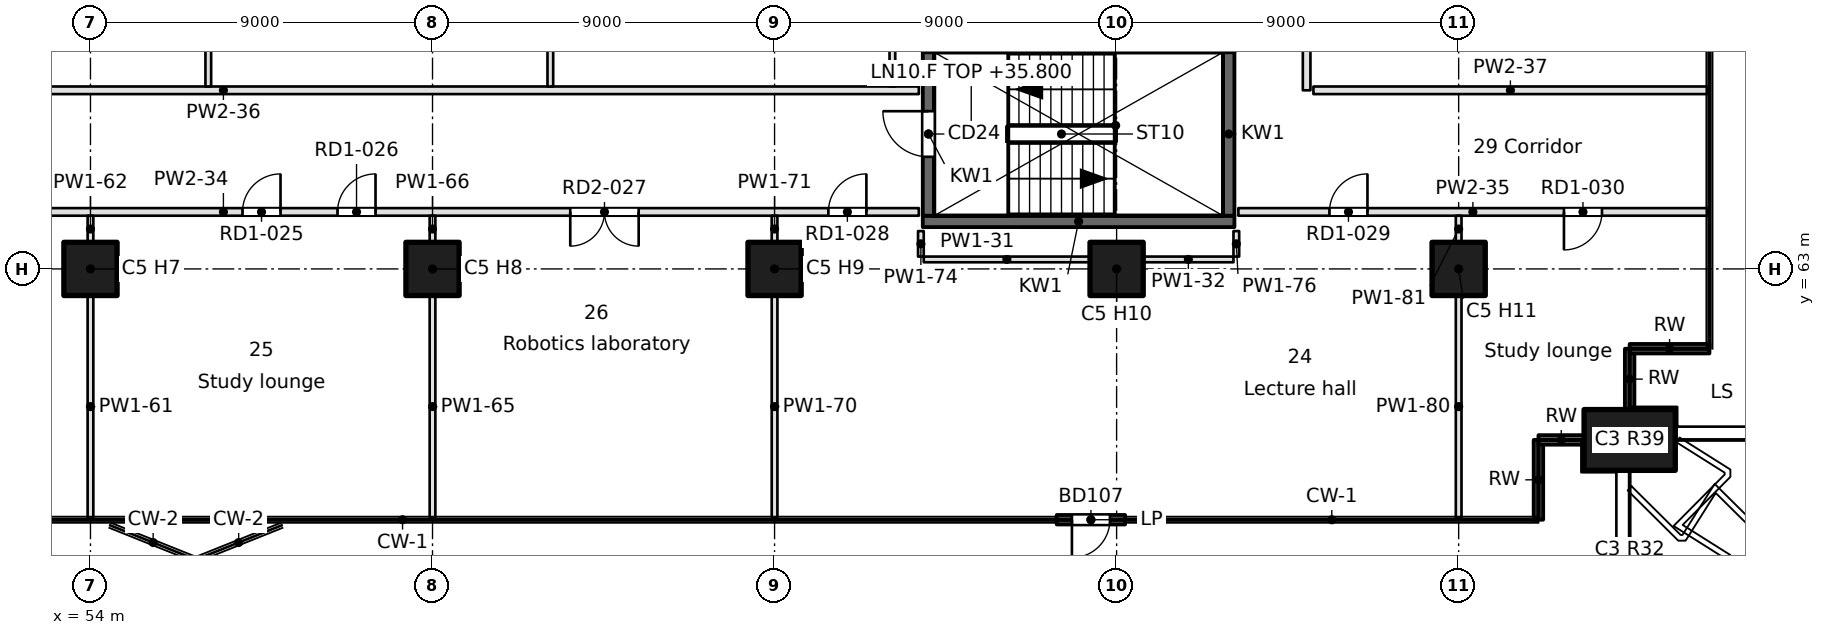
"""IFC4 building model, lengths in metres.
Left out: names, types, materials, properties, quantities, classifications, styles, units other than length and angle.
Written with IfcOpenShell. Run it as: python <this file> out.ifc"""

import sys

from ifc_helpers import new_model, si_unit, direction, frame, frame_2d, origin, origin_2d, place, context, subcontext, project, spatial, rectangle, extrude, element, fill, save


model = new_model("IFC4")
c1 = context("Model", 3, precision=1e-05, world=origin(), true_north=direction((0.0, 1.0)))
c2 = subcontext(c1, "Body", "Model", "MODEL_VIEW")
j1 = project(units=[si_unit("LENGTHUNIT", "METRE"), si_unit("PLANEANGLEUNIT", "RADIAN")], contexts=[c1])
p1 = place(None, origin())
s1 = spatial("IfcSite", under=j1, at=p1, CompositionType="ELEMENT")
p2 = place(p1, origin())
s2 = spatial("IfcBuilding", under=s1, at=p2, CompositionType="ELEMENT")
p3 = place(p2, frame((0.0, 0.0, 35.8)))
s3 = spatial("IfcBuildingStorey", under=s2, at=p3, CompositionType="ELEMENT", Elevation=35.8)
p4 = place(p3, frame((94.5, 58.5, 0.0), z_axis=(0.0, 0.0, 1.0), x_axis=(1.0, 0.0, 0.0)))
e1 = element("IfcColumn", 1, at=p4, inside=s3, PredefinedType="COLUMN", context=c2, shape_type="SweptSolid", body=[
    extrude(rectangle(XDim=2.4, YDim=1.6, at=origin_2d()), origin(), (0.0, 0.0, 1.0), 3.7),
])
for number, where, z_axis, x_axis in (
    (2, (54.0, 63.0, 0.0), (0.0, 0.0, 1.0), (1.0, 0.0, 0.0)),
    (3, (63.0, 63.0, 0.0), (0.0, 0.0, 1.0), (1.0, 0.0, 0.0)),
    (4, (72.0, 63.0, 0.0), (0.0, 0.0, 1.0), (1.0, 0.0, 0.0)),
    (5, (81.0, 63.0, 0.0), (0.0, 0.0, 1.0), (1.0, 0.0, 0.0)),
    (6, (90.0, 63.0, 0.0), (0.0, 0.0, 1.0), (1.0, 0.0, 0.0)),
):
    element("IfcColumn", number, at=place(p3, frame(where, z_axis=z_axis, x_axis=x_axis)), inside=s3, PredefinedType="COLUMN", context=c2, shape_type="SweptSolid", body=[
        extrude(rectangle(XDim=1.4, YDim=1.4, at=origin_2d()), origin(), (0.0, 0.0, 1.0), 3.7),
    ])
p5 = place(p3, frame((79.424, 56.401, 0.0), z_axis=(0.0, 0.0, 1.0), x_axis=(1.0, 0.0, 0.0)))
e7 = element("IfcWall", 7, at=p5, inside=s3, PredefinedType="SOLIDWALL", context=c2, shape_type="SweptSolid", body=[
    extrude(rectangle(XDim=1.8, YDim=0.25, at=frame_2d((0.9, 0.0))), origin(), (0.0, 0.0, 1.0), 3.3),
])
p6 = place(p5, frame((0.4, 0.0, 0.0)))
e8 = element("IfcOpeningElement", 8, at=p6, cuts=e7, PredefinedType="OPENING", context=c2, shape_type="SweptSolid", body=[
    extrude(rectangle(XDim=1.0, YDim=2.1, at=frame_2d((0.5, 1.05))), frame((0.0, 0.125, 0.0), z_axis=(0.0, -1.0, 0.0), x_axis=(1.0, 0.0, 0.0)), (0.0, 0.0, 1.0), 0.25),
])
p7 = place(p3, frame((92.099, 56.401, 0.0), z_axis=(0.0, 0.0, 1.0), x_axis=(0.00011626555, 0.999999993241, 0.0)))
e9 = element("IfcWall", 9, at=p7, inside=s3, PredefinedType="SOLIDWALL", context=c2, shape_type="SweptSolid", body=[
    extrude(rectangle(XDim=2.1, YDim=0.25, at=frame_2d((1.05, 0.0))), origin(), (0.0, 0.0, 1.0), 3.3),
])
p8 = place(p3, frame((92.099, 58.501, 0.0), z_axis=(0.0, 0.0, 1.0), x_axis=(1.0, 0.0, 0.0)))
e10 = element("IfcWall", 10, at=p8, inside=s3, PredefinedType="SOLIDWALL", context=c2, shape_type="SweptSolid", body=[
    extrude(rectangle(XDim=1.201, YDim=0.25, at=frame_2d((0.6, 0.0))), origin(), (0.0, 0.0, 1.0), 3.3),
])
p9 = place(p3, frame((94.499, 59.3, 0.0), z_axis=(0.0, 0.0, 1.0), x_axis=(0.00015253203, 0.999999988367, 0.0)))
e11 = element("IfcWall", 11, at=p9, inside=s3, PredefinedType="SOLIDWALL", context=c2, shape_type="SweptSolid", body=[
    extrude(rectangle(XDim=1.601, YDim=0.25, at=frame_2d((0.8, 0.0))), origin(), (0.0, 0.0, 1.0), 3.3),
])
p10 = place(p3, frame((94.499, 60.901, 0.0), z_axis=(0.0, 0.0, 1.0), x_axis=(0.999999993241, 0.00011626555, 0.0)))
e12 = element("IfcWall", 12, at=p10, inside=s3, PredefinedType="SOLIDWALL", context=c2, shape_type="SweptSolid", body=[
    extrude(rectangle(XDim=2.1, YDim=0.25, at=frame_2d((1.05, 0.0))), origin(), (0.0, 0.0, 1.0), 3.3),
])
p11 = place(p3, frame((75.9, 64.25, -0.4), z_axis=(0.0, 0.0, 1.0), x_axis=(1.0, 0.0, 0.0)))
e13 = element("IfcWall", 13, at=p11, inside=s3, PredefinedType="SOLIDWALL", context=c2, shape_type="SweptSolid", body=[
    extrude(rectangle(XDim=8.2, YDim=0.3, at=frame_2d((4.1, 0.0))), origin(), (0.0, 0.0, 1.0), 3.7),
])
p12 = place(p3, frame((76.05, 64.4, -0.4), z_axis=(0.0, 0.0, 1.0), x_axis=(0.0, 1.0, 0.0)))
e14 = element("IfcWall", 14, at=p12, inside=s3, PredefinedType="SOLIDWALL", context=c2, shape_type="SweptSolid", body=[
    extrude(rectangle(XDim=4.3, YDim=0.3, at=frame_2d((2.15, 0.0))), origin(), (0.0, 0.0, 1.0), 3.7),
])
p13 = place(p12, frame((1.55, 0.0, 0.4)))
e15 = element("IfcOpeningElement", 15, at=p13, cuts=e14, PredefinedType="OPENING", context=c2, shape_type="SweptSolid", body=[
    extrude(rectangle(XDim=1.2, YDim=2.1, at=frame_2d((0.6, 1.05))), frame((0.0, 0.15, 0.0), z_axis=(0.0, -1.0, 0.0), x_axis=(1.0, 0.0, 0.0)), (0.0, 0.0, 1.0), 0.3),
])
p14 = place(p3, frame((83.95, 64.4, -0.4), z_axis=(0.0, 0.0, 1.0), x_axis=(0.0, 1.0, 0.0)))
e16 = element("IfcWall", 16, at=p14, inside=s3, PredefinedType="SOLIDWALL", context=c2, shape_type="SweptSolid", body=[
    extrude(rectangle(XDim=4.3, YDim=0.3, at=frame_2d((2.15, 0.0))), origin(), (0.0, 0.0, 1.0), 3.7),
])
p15 = place(p3, frame((75.925, 63.25, 0.0), z_axis=(0.0, 0.0, 1.0), x_axis=(1.0, 0.0, 0.0)))
e17 = element("IfcWall", 17, at=p15, inside=s3, PredefinedType="PARTITIONING", context=c2, shape_type="SweptSolid", body=[
    extrude(rectangle(XDim=4.375, YDim=0.15, at=frame_2d((2.188, 0.0))), origin(), (0.0, 0.0, 1.0), 3.3),
])
p16 = place(p3, frame((81.7, 63.25, 0.0), z_axis=(0.0, 0.0, 1.0), x_axis=(1.0, 0.0, 0.0)))
e18 = element("IfcWall", 18, at=p16, inside=s3, PredefinedType="PARTITIONING", context=c2, shape_type="SweptSolid", body=[
    extrude(rectangle(XDim=2.375, YDim=0.15, at=frame_2d((1.188, 0.0))), origin(), (0.0, 0.0, 1.0), 3.3),
])
p17 = place(p3, frame((75.796, 64.5, 0.0), z_axis=(0.0, 0.0, 1.0), x_axis=(-1.0, 0.0, 0.0)))
e19 = element("IfcWall", 19, at=p17, inside=s3, PredefinedType="PARTITIONING", context=c2, shape_type="SweptSolid", body=[
    extrude(rectangle(XDim=36.596, YDim=0.2, at=frame_2d((18.298, 0.0))), origin(), (0.0, 0.0, 1.0), 3.3),
])
p18 = place(p17, frame((28.702, 0.0, 0.0)))
e20 = element("IfcOpeningElement", 20, at=p18, cuts=e19, PredefinedType="OPENING", context=c2, shape_type="SweptSolid", body=[
    extrude(rectangle(XDim=1.0, YDim=2.1, at=frame_2d((0.5, 1.05))), frame((0.0, 0.1, 0.0), z_axis=(0.0, -1.0, 0.0), x_axis=(1.0, 0.0, 0.0)), (0.0, 0.0, 1.0), 0.2),
])
p19 = place(p17, frame((26.202, 0.0, 0.0)))
e21 = element("IfcOpeningElement", 21, at=p19, cuts=e19, PredefinedType="OPENING", context=c2, shape_type="SweptSolid", body=[
    extrude(rectangle(XDim=1.0, YDim=2.1, at=frame_2d((0.5, 1.05))), frame((0.0, 0.1, 0.0), z_axis=(0.0, -1.0, 0.0), x_axis=(1.0, 0.0, 0.0)), (0.0, 0.0, 1.0), 0.2),
])
p20 = place(p17, frame((16.795, 0.0, 0.0)))
e22 = element("IfcOpeningElement", 22, at=p20, cuts=e19, PredefinedType="OPENING", context=c2, shape_type="SweptSolid", body=[
    extrude(rectangle(XDim=1.0, YDim=2.1, at=frame_2d((0.5, 1.05))), frame((0.0, 0.1, 0.0), z_axis=(0.0, -1.0, 0.0), x_axis=(1.0, 0.0, 0.0)), (0.0, 0.0, 1.0), 0.2),
])
p21 = place(p17, frame((14.295, 0.0, 0.0)))
e23 = element("IfcOpeningElement", 23, at=p21, cuts=e19, PredefinedType="OPENING", context=c2, shape_type="SweptSolid", body=[
    extrude(rectangle(XDim=1.0, YDim=2.1, at=frame_2d((0.5, 1.05))), frame((0.0, 0.1, 0.0), z_axis=(0.0, -1.0, 0.0), x_axis=(1.0, 0.0, 0.0)), (0.0, 0.0, 1.0), 0.2),
])
p22 = place(p17, frame((7.372, 0.0, 0.0)))
e24 = element("IfcOpeningElement", 24, at=p22, cuts=e19, PredefinedType="OPENING", context=c2, shape_type="SweptSolid", body=[
    extrude(rectangle(XDim=1.8, YDim=2.1, at=frame_2d((0.9, 1.05))), frame((0.0, 0.1, 0.0), z_axis=(0.0, -1.0, 0.0), x_axis=(1.0, 0.0, 0.0)), (0.0, 0.0, 1.0), 0.2),
])
p23 = place(p17, frame((1.38, 0.0, 0.0)))
e25 = element("IfcOpeningElement", 25, at=p23, cuts=e19, PredefinedType="OPENING", context=c2, shape_type="SweptSolid", body=[
    extrude(rectangle(XDim=1.0, YDim=2.1, at=frame_2d((0.5, 1.05))), frame((0.0, 0.1, 0.0), z_axis=(0.0, -1.0, 0.0), x_axis=(1.0, 0.0, 0.0)), (0.0, 0.0, 1.0), 0.2),
])
p24 = place(p3, frame((96.545, 64.5, 0.0), z_axis=(0.0, 0.0, 1.0), x_axis=(-1.0, 0.0, 0.0)))
e26 = element("IfcWall", 26, at=p24, inside=s3, PredefinedType="PARTITIONING", context=c2, shape_type="SweptSolid", body=[
    extrude(rectangle(XDim=12.341, YDim=0.2, at=frame_2d((6.17, 0.0))), origin(), (0.0, 0.0, 1.0), 3.3),
])
p25 = place(p24, frame((8.945, 0.0, 0.0)))
e27 = element("IfcOpeningElement", 27, at=p25, cuts=e26, PredefinedType="OPENING", context=c2, shape_type="SweptSolid", body=[
    extrude(rectangle(XDim=1.0, YDim=2.1, at=frame_2d((0.5, 1.05))), frame((0.0, 0.1, 0.0), z_axis=(0.0, -1.0, 0.0), x_axis=(1.0, 0.0, 0.0)), (0.0, 0.0, 1.0), 0.2),
])
p26 = place(p24, frame((2.774, 0.0, 0.0)))
e28 = element("IfcOpeningElement", 28, at=p26, cuts=e26, PredefinedType="OPENING", context=c2, shape_type="SweptSolid", body=[
    extrude(rectangle(XDim=1.0, YDim=2.1, at=frame_2d((0.5, 1.05))), frame((0.0, 0.1, 0.0), z_axis=(0.0, -1.0, 0.0), x_axis=(1.0, 0.0, 0.0)), (0.0, 0.0, 1.0), 0.2),
])
p27 = place(p3, frame((39.2, 67.7, 0.0), z_axis=(0.0, 0.0, 1.0), x_axis=(1.0, 0.0, 0.0)))
e29 = element("IfcWall", 29, at=p27, inside=s3, PredefinedType="PARTITIONING", context=c2, shape_type="SweptSolid", body=[
    extrude(rectangle(XDim=36.596, YDim=0.2, at=frame_2d((18.298, 0.0))), origin(), (0.0, 0.0, 1.0), 3.3),
])
p28 = place(p3, frame((86.178, 67.7, 0.0), z_axis=(0.0, 0.0, 1.0), x_axis=(1.0, 0.0, 0.0)))
e30 = element("IfcWall", 30, at=p28, inside=s3, PredefinedType="PARTITIONING", context=c2, shape_type="SweptSolid", body=[
    extrude(rectangle(XDim=10.366, YDim=0.2, at=frame_2d((5.183, 0.0))), origin(), (0.0, 0.0, 1.0), 3.3),
])
p29 = place(p3, frame((54.0, 62.3, 0.0), z_axis=(0.0, 0.0, 1.0), x_axis=(0.0, -1.0, 0.0)))
e31 = element("IfcWall", 31, at=p29, inside=s3, PredefinedType="PARTITIONING", context=c2, shape_type="SweptSolid", body=[
    extrude(rectangle(XDim=5.845, YDim=0.15, at=frame_2d((2.923, 0.0))), origin(), (0.0, 0.0, 1.0), 3.3),
])
p30 = place(p3, frame((54.0, 64.4, 0.0), z_axis=(0.0, 0.0, 1.0), x_axis=(0.0, -1.0, 0.0)))
e32 = element("IfcWall", 32, at=p30, inside=s3, PredefinedType="PARTITIONING", context=c2, shape_type="SweptSolid", body=[
    extrude(rectangle(XDim=0.7, YDim=0.15, at=frame_2d((0.35, 0.0))), origin(), (0.0, 0.0, 1.0), 3.3),
])
p31 = place(p3, frame((57.1, 81.7, 0.0), z_axis=(0.0, 0.0, 1.0), x_axis=(0.0, -1.0, 0.0)))
e33 = element("IfcWall", 33, at=p31, inside=s3, PredefinedType="PARTITIONING", context=c2, shape_type="SweptSolid", body=[
    extrude(rectangle(XDim=13.9, YDim=0.15, at=frame_2d((6.95, 0.0))), origin(), (0.0, 0.0, 1.0), 3.3),
])
p32 = place(p3, frame((63.0, 62.3, 0.0), z_axis=(0.0, 0.0, 1.0), x_axis=(0.0, -1.0, 0.0)))
e34 = element("IfcWall", 34, at=p32, inside=s3, PredefinedType="PARTITIONING", context=c2, shape_type="SweptSolid", body=[
    extrude(rectangle(XDim=5.845, YDim=0.15, at=frame_2d((2.923, 0.0))), origin(), (0.0, 0.0, 1.0), 3.3),
])
p33 = place(p3, frame((63.0, 64.4, 0.0), z_axis=(0.0, 0.0, 1.0), x_axis=(0.0, -1.0, 0.0)))
e35 = element("IfcWall", 35, at=p33, inside=s3, PredefinedType="PARTITIONING", context=c2, shape_type="SweptSolid", body=[
    extrude(rectangle(XDim=0.7, YDim=0.15, at=frame_2d((0.35, 0.0))), origin(), (0.0, 0.0, 1.0), 3.3),
])
p34 = place(p3, frame((66.1, 81.7, 0.0), z_axis=(0.0, 0.0, 1.0), x_axis=(0.0, -1.0, 0.0)))
e36 = element("IfcWall", 36, at=p34, inside=s3, PredefinedType="PARTITIONING", context=c2, shape_type="SweptSolid", body=[
    extrude(rectangle(XDim=13.9, YDim=0.15, at=frame_2d((6.95, 0.0))), origin(), (0.0, 0.0, 1.0), 3.3),
])
p35 = place(p3, frame((72.0, 62.3, 0.0), z_axis=(0.0, 0.0, 1.0), x_axis=(0.0, -1.0, 0.0)))
e37 = element("IfcWall", 37, at=p35, inside=s3, PredefinedType="PARTITIONING", context=c2, shape_type="SweptSolid", body=[
    extrude(rectangle(XDim=5.845, YDim=0.15, at=frame_2d((2.923, 0.0))), origin(), (0.0, 0.0, 1.0), 3.3),
])
p36 = place(p3, frame((72.0, 64.4, 0.0), z_axis=(0.0, 0.0, 1.0), x_axis=(0.0, -1.0, 0.0)))
e38 = element("IfcWall", 38, at=p36, inside=s3, PredefinedType="PARTITIONING", context=c2, shape_type="SweptSolid", body=[
    extrude(rectangle(XDim=0.7, YDim=0.15, at=frame_2d((0.35, 0.0))), origin(), (0.0, 0.0, 1.0), 3.3),
])
p37 = place(p3, frame((75.1, 81.7, 0.0), z_axis=(0.0, 0.0, 1.0), x_axis=(0.0, -1.0, 0.0)))
e39 = element("IfcWall", 39, at=p37, inside=s3, PredefinedType="PARTITIONING", context=c2, shape_type="SweptSolid", body=[
    extrude(rectangle(XDim=13.9, YDim=0.15, at=frame_2d((6.95, 0.0))), origin(), (0.0, 0.0, 1.0), 3.3),
])
for number, where, z_axis, x_axis in (
    (40, (75.85, 63.996, 0.0), (0.0, 0.0, 1.0), (0.0, -1.0, 0.0)),
    (41, (84.15, 63.996, 0.0), (0.0, 0.0, 1.0), (0.0, -1.0, 0.0)),
):
    element("IfcWall", number, at=place(p3, frame(where, z_axis=z_axis, x_axis=x_axis)), inside=s3, PredefinedType="PARTITIONING", context=c2, shape_type="SweptSolid", body=[
        extrude(rectangle(XDim=0.671, YDim=0.15, at=frame_2d((0.335, 0.0))), origin(), (0.0, 0.0, 1.0), 3.3),
    ])
p38 = place(p3, frame((86.0, 81.7, 0.0), z_axis=(0.0, 0.0, 1.0), x_axis=(0.0, -1.0, 0.0)))
e42 = element("IfcWall", 42, at=p38, inside=s3, PredefinedType="PARTITIONING", context=c2, shape_type="SweptSolid", body=[
    extrude(rectangle(XDim=14.0, YDim=0.2, at=frame_2d((7.0, 0.0))), origin(), (0.0, 0.0, 1.0), 3.3),
])
p39 = place(p38, frame((6.5, 0.0, 0.0)))
e43 = element("IfcOpeningElement", 43, at=p39, cuts=e42, PredefinedType="OPENING", context=c2, shape_type="SweptSolid", body=[
    extrude(rectangle(XDim=1.0, YDim=2.1, at=frame_2d((0.5, 1.05))), frame((0.0, 0.1, 0.0), z_axis=(0.0, -1.0, 0.0), x_axis=(1.0, 0.0, 0.0)), (0.0, 0.0, 1.0), 0.2),
])
p40 = place(p38, frame((4.0, 0.0, 0.0)))
e44 = element("IfcOpeningElement", 44, at=p40, cuts=e42, PredefinedType="OPENING", context=c2, shape_type="SweptSolid", body=[
    extrude(rectangle(XDim=1.0, YDim=2.1, at=frame_2d((0.5, 1.05))), frame((0.0, 0.1, 0.0), z_axis=(0.0, -1.0, 0.0), x_axis=(1.0, 0.0, 0.0)), (0.0, 0.0, 1.0), 0.2),
])
p41 = place(p3, frame((90.0, 62.3, 0.0), z_axis=(0.0, 0.0, 1.0), x_axis=(0.0, -1.0, 0.0)))
e45 = element("IfcWall", 45, at=p41, inside=s3, PredefinedType="PARTITIONING", context=c2, shape_type="SweptSolid", body=[
    extrude(rectangle(XDim=5.845, YDim=0.15, at=frame_2d((2.922, 0.0))), origin(), (0.0, 0.0, 1.0), 3.3),
])
p42 = place(p3, frame((90.0, 64.4, 0.0), z_axis=(0.0, 0.0, 1.0), x_axis=(0.0, -1.0, 0.0)))
e46 = element("IfcWall", 46, at=p42, inside=s3, PredefinedType="PARTITIONING", context=c2, shape_type="SweptSolid", body=[
    extrude(rectangle(XDim=0.7, YDim=0.15, at=frame_2d((0.35, 0.0))), origin(), (0.0, 0.0, 1.0), 3.3),
])
p43 = place(p6, frame((1.0, 0.0, 0.0), z_axis=(0.0, 0.0, 1.0), x_axis=(-1.0, 0.0, 0.0)))
e47 = element("IfcDoor", 47, at=p43, inside=s3, OperationType="SINGLE_SWING_RIGHT", PredefinedType="DOOR", context=c2, shape_type="SweptSolid", body=[
    extrude(rectangle(XDim=1.0, YDim=2.1, at=frame_2d((0.5, 1.05))), frame((0.0, 0.025, 0.0), z_axis=(0.0, -1.0, 0.0), x_axis=(1.0, 0.0, 0.0)), (0.0, 0.0, 1.0), 0.05),
])
fill(e8, e47)
p44 = place(p13, origin())
e48 = element("IfcDoor", 48, at=p44, inside=s3, OperationType="SINGLE_SWING_RIGHT", PredefinedType="DOOR", context=c2, shape_type="SweptSolid", body=[
    extrude(rectangle(XDim=1.2, YDim=2.1, at=frame_2d((0.6, 1.05))), frame((0.0, 0.025, 0.0), z_axis=(0.0, -1.0, 0.0), x_axis=(1.0, 0.0, 0.0)), (0.0, 0.0, 1.0), 0.05),
])
fill(e15, e48)
p45 = place(p20, frame((1.0, 0.0, 0.0), z_axis=(0.0, 0.0, 1.0), x_axis=(-1.0, 0.0, 0.0)))
e49 = element("IfcDoor", 49, at=p45, inside=s3, OperationType="SINGLE_SWING_RIGHT", PredefinedType="DOOR", context=c2, shape_type="SweptSolid", body=[
    extrude(rectangle(XDim=1.0, YDim=2.1, at=frame_2d((0.5, 1.05))), frame((0.0, 0.025, 0.0), z_axis=(0.0, -1.0, 0.0), x_axis=(1.0, 0.0, 0.0)), (0.0, 0.0, 1.0), 0.05),
])
fill(e22, e49)
p46 = place(p21, frame((1.0, 0.0, 0.0), z_axis=(0.0, 0.0, 1.0), x_axis=(-1.0, 0.0, 0.0)))
e50 = element("IfcDoor", 50, at=p46, inside=s3, OperationType="SINGLE_SWING_RIGHT", PredefinedType="DOOR", context=c2, shape_type="SweptSolid", body=[
    extrude(rectangle(XDim=1.0, YDim=2.1, at=frame_2d((0.5, 1.05))), frame((0.0, 0.025, 0.0), z_axis=(0.0, -1.0, 0.0), x_axis=(1.0, 0.0, 0.0)), (0.0, 0.0, 1.0), 0.05),
])
fill(e23, e50)
p47 = place(p22, origin())
e51 = element("IfcDoor", 51, at=p47, inside=s3, OperationType="DOUBLE_DOOR_SINGLE_SWING", PredefinedType="DOOR", context=c2, shape_type="SweptSolid", body=[
    extrude(rectangle(XDim=1.8, YDim=2.1, at=frame_2d((0.9, 1.05))), frame((0.0, 0.025, 0.0), z_axis=(0.0, -1.0, 0.0), x_axis=(1.0, 0.0, 0.0)), (0.0, 0.0, 1.0), 0.05),
])
fill(e24, e51)
p48 = place(p23, frame((1.0, 0.0, 0.0), z_axis=(0.0, 0.0, 1.0), x_axis=(-1.0, 0.0, 0.0)))
e52 = element("IfcDoor", 52, at=p48, inside=s3, OperationType="SINGLE_SWING_RIGHT", PredefinedType="DOOR", context=c2, shape_type="SweptSolid", body=[
    extrude(rectangle(XDim=1.0, YDim=2.1, at=frame_2d((0.5, 1.05))), frame((0.0, 0.025, 0.0), z_axis=(0.0, -1.0, 0.0), x_axis=(1.0, 0.0, 0.0)), (0.0, 0.0, 1.0), 0.05),
])
fill(e25, e52)
p49 = place(p25, frame((1.0, 0.0, 0.0), z_axis=(0.0, 0.0, 1.0), x_axis=(-1.0, 0.0, 0.0)))
e53 = element("IfcDoor", 53, at=p49, inside=s3, OperationType="SINGLE_SWING_RIGHT", PredefinedType="DOOR", context=c2, shape_type="SweptSolid", body=[
    extrude(rectangle(XDim=1.0, YDim=2.1, at=frame_2d((0.5, 1.05))), frame((0.0, 0.025, 0.0), z_axis=(0.0, -1.0, 0.0), x_axis=(1.0, 0.0, 0.0)), (0.0, 0.0, 1.0), 0.05),
])
fill(e27, e53)
p50 = place(p26, origin())
e54 = element("IfcDoor", 54, at=p50, inside=s3, OperationType="SINGLE_SWING_RIGHT", PredefinedType="DOOR", context=c2, shape_type="SweptSolid", body=[
    extrude(rectangle(XDim=1.0, YDim=2.1, at=frame_2d((0.5, 1.05))), frame((0.0, 0.025, 0.0), z_axis=(0.0, -1.0, 0.0), x_axis=(1.0, 0.0, 0.0)), (0.0, 0.0, 1.0), 0.05),
])
fill(e28, e54)
save(model, sys.argv[1])
